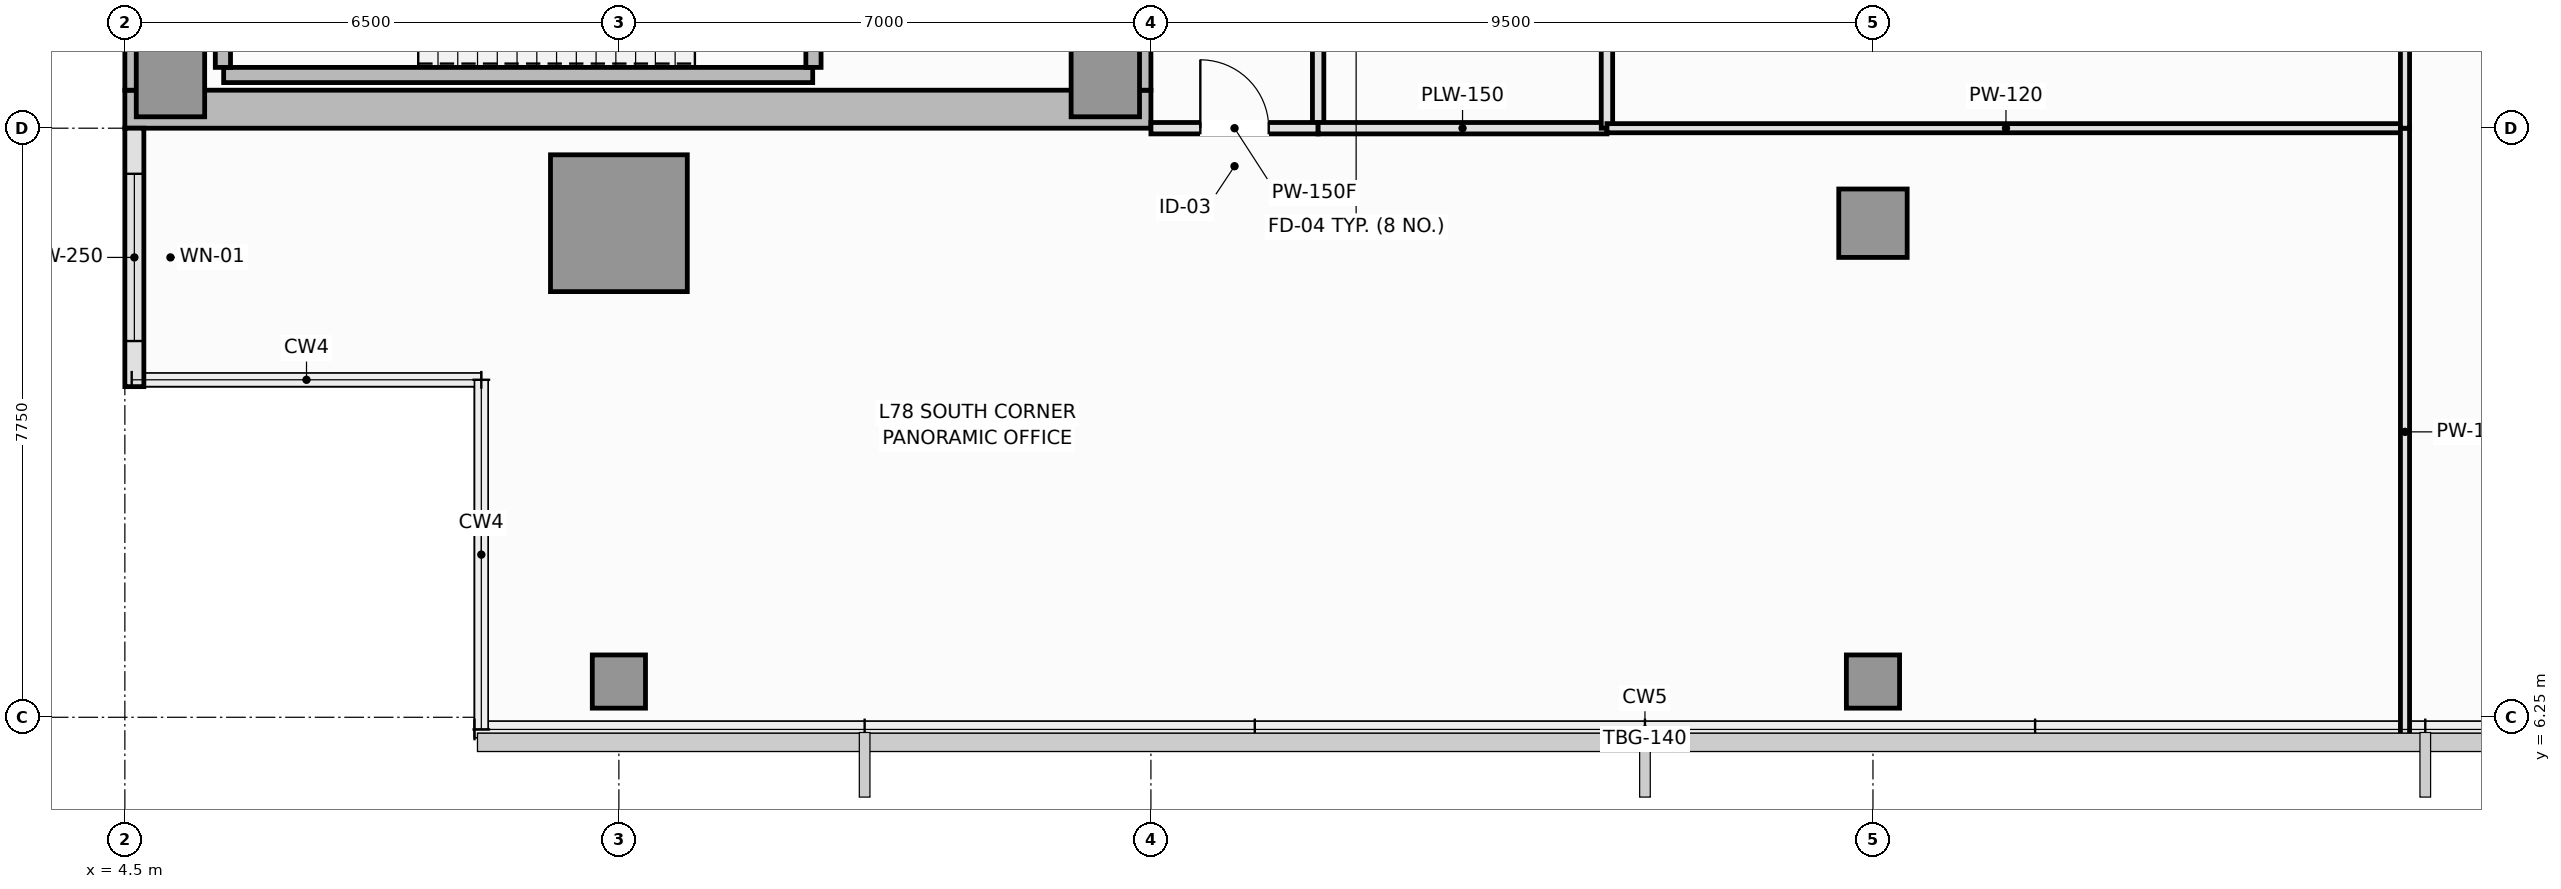
"""IFC4 building model, lengths in metres.
Left out: names, types, materials, properties, quantities, classifications, styles, units other than length and angle.
Written with IfcOpenShell. Run it as: python <this file> out.ifc"""

import sys

from ifc_helpers import new_model, si_unit, direction, frame, frame_2d, origin, origin_2d, place, context, subcontext, project, spatial, rectangle, extrude, element, fill, save


model = new_model("IFC4")
c1 = context("Model", 3, precision=1e-05, world=origin(), true_north=direction((0.0, 1.0)))
c2 = subcontext(c1, "Body", "Model", "MODEL_VIEW")
j1 = project(units=[si_unit("LENGTHUNIT", "METRE"), si_unit("PLANEANGLEUNIT", "RADIAN")], contexts=[c1])
p1 = place(None, origin())
s1 = spatial("IfcSite", under=j1, at=p1, CompositionType="ELEMENT")
p2 = place(p1, origin())
s2 = spatial("IfcBuilding", under=s1, at=p2, CompositionType="ELEMENT")
p3 = place(p2, frame((0.0, 0.0, 291.85)))
s3 = spatial("IfcBuildingStorey", under=s2, at=p3, CompositionType="ELEMENT", Elevation=291.85)
p4 = place(p3, frame((4.5, 14.25, 0.0), z_axis=(0.0, 0.0, 1.0), x_axis=(1.0, 0.0, 0.0)))
e1 = element("IfcWall", 1, at=p4, inside=s3, PredefinedType="SHEAR", context=c2, shape_type="SweptSolid", body=[
    extrude(rectangle(XDim=13.5, YDim=0.5, at=frame_2d((6.75, 0.0))), origin(), (0.0, 0.0, 1.0), 4.8),
])
p5 = place(p3, frame((4.75, 14.5, 0.0), z_axis=(0.0, 0.0, 1.0), x_axis=(0.0, 1.0, 0.0)))
e2 = element("IfcWall", 2, at=p5, inside=s3, PredefinedType="SHEAR", context=c2, shape_type="SweptSolid", body=[
    extrude(rectangle(XDim=21.5, YDim=0.5, at=frame_2d((10.75, 0.0))), origin(), (0.0, 0.0, 1.0), 4.8),
])
p6 = place(p3, frame((17.75, 14.5, 0.0), z_axis=(0.0, 0.0, 1.0), x_axis=(0.0, 1.0, 0.0)))
e3 = element("IfcWall", 3, at=p6, inside=s3, PredefinedType="SHEAR", context=c2, shape_type="SweptSolid", body=[
    extrude(rectangle(XDim=8.95, YDim=0.5, at=frame_2d((4.475, 0.0))), origin(), (0.0, 0.0, 1.0), 4.8),
])
p7 = place(p6, frame((4.4, 0.0, 0.0)))
e4 = element("IfcOpeningElement", 4, at=p7, cuts=e3, PredefinedType="OPENING", context=c2, shape_type="SweptSolid", body=[
    extrude(rectangle(XDim=1.1, YDim=2.15, at=frame_2d((0.55, 1.075))), frame((0.0, 0.26, 0.0), z_axis=(0.0, -1.0, 0.0), x_axis=(1.0, 0.0, 0.0)), (0.0, 0.0, 1.0), 0.52),
])
for number, where, z_axis, x_axis in (
    (5, (5.1, 14.6, 0.0), (0.0, 0.0, 1.0), (1.0, 0.0, 0.0)),
    (6, (17.4, 14.6, 0.0), (0.0, 0.0, 1.0), (1.0, 0.0, 0.0)),
):
    element("IfcColumn", number, at=place(p3, frame(where, z_axis=z_axis, x_axis=x_axis)), inside=s3, PredefinedType="PILASTER", context=c2, shape_type="SweptSolid", body=[
        extrude(rectangle(XDim=0.9, YDim=0.9, at=origin_2d()), origin(), (0.0, 0.0, 1.0), 4.8),
    ])
p8 = place(p3, frame((11.0, 12.75, 0.0), z_axis=(0.0, 0.0, 1.0), x_axis=(1.0, 0.0, 0.0)))
e7 = element("IfcColumn", 7, at=p8, inside=s3, PredefinedType="COLUMN", context=c2, shape_type="SweptSolid", body=[
    extrude(rectangle(XDim=1.8, YDim=1.8, at=origin_2d()), origin(), (0.0, 0.0, 1.0), 4.8),
])
p9 = place(p3, frame((27.5, 12.75, 0.0), z_axis=(0.0, 0.0, 1.0), x_axis=(1.0, 0.0, 0.0)))
e8 = element("IfcColumn", 8, at=p9, inside=s3, PredefinedType="COLUMN", context=c2, shape_type="SweptSolid", body=[
    extrude(rectangle(XDim=0.9, YDim=0.9, at=origin_2d()), origin(), (0.0, 0.0, 1.0), 4.8),
])
for number, where, z_axis, x_axis in (
    (9, (11.0, 6.72, 0.0), (0.0, 0.0, 1.0), (1.0, 0.0, 0.0)),
    (10, (27.5, 6.72, 0.0), (0.0, 0.0, 1.0), (1.0, 0.0, 0.0)),
):
    element("IfcColumn", number, at=place(p3, frame(where, z_axis=z_axis, x_axis=x_axis)), inside=s3, PredefinedType="COLUMN", context=c2, shape_type="SweptSolid", body=[
        extrude(rectangle(XDim=0.7, YDim=0.7, at=origin_2d()), origin(), (0.0, 0.0, 1.0), 4.8),
    ])
p10 = place(p3, frame((4.625, 14.0, 0.0), z_axis=(0.0, 0.0, 1.0), x_axis=(0.0, -1.0, 0.0)))
e11 = element("IfcWall", 11, at=p10, inside=s3, PredefinedType="SOLIDWALL", context=c2, shape_type="SweptSolid", body=[
    extrude(rectangle(XDim=3.4, YDim=0.25, at=frame_2d((1.7, 0.0))), origin(), (0.0, 0.0, 1.0), 4.6),
])
p11 = place(p10, frame((0.6, 0.0, 0.9)))
e12 = element("IfcOpeningElement", 12, at=p11, cuts=e11, PredefinedType="OPENING", context=c2, shape_type="SweptSolid", body=[
    extrude(rectangle(XDim=2.2, YDim=1.8, at=frame_2d((1.1, 0.9))), frame((0.0, 0.135, 0.0), z_axis=(0.0, -1.0, 0.0), x_axis=(1.0, 0.0, 0.0)), (0.0, 0.0, 1.0), 0.27),
])
p12 = place(p3, frame((5.8, 14.7, 0.0), z_axis=(0.0, 0.0, 1.0), x_axis=(1.0, 0.0, 0.0)))
e13 = element("IfcWall", 13, at=p12, inside=s3, PredefinedType="SOLIDWALL", context=c2, shape_type="SweptSolid", body=[
    extrude(rectangle(XDim=7.75, YDim=0.2, at=frame_2d((3.875, 0.0))), origin(), (0.0, 0.0, 1.0), 4.8),
])
p13 = place(p3, frame((5.79, 14.8, 0.0), z_axis=(0.0, 0.0, 1.0), x_axis=(0.0, 1.0, 0.0)))
e14 = element("IfcWall", 14, at=p13, inside=s3, PredefinedType="SOLIDWALL", context=c2, shape_type="SweptSolid", body=[
    extrude(rectangle(XDim=3.05, YDim=0.2, at=frame_2d((1.525, 0.0))), origin(), (0.0, 0.0, 1.0), 4.8),
])
p14 = place(p3, frame((13.56, 14.8, 0.0), z_axis=(0.0, 0.0, 1.0), x_axis=(0.0, 1.0, 0.0)))
e15 = element("IfcWall", 15, at=p14, inside=s3, PredefinedType="SOLIDWALL", context=c2, shape_type="SweptSolid", body=[
    extrude(rectangle(XDim=3.05, YDim=0.2, at=frame_2d((1.525, 0.0))), origin(), (0.0, 0.0, 1.0), 4.8),
])
p15 = place(p14, frame((0.95, 0.0, 0.0)))
e16 = element("IfcOpeningElement", 16, at=p15, cuts=e15, PredefinedType="OPENING", context=c2, shape_type="SweptSolid", body=[
    extrude(rectangle(XDim=1.15, YDim=2.15, at=frame_2d((0.575, 1.075))), frame((0.0, 0.11, 0.0), z_axis=(0.0, -1.0, 0.0), x_axis=(1.0, 0.0, 0.0)), (0.0, 0.0, 1.0), 0.22),
])
p16 = place(p3, frame((20.2, 14.0, 0.0), z_axis=(0.0, 0.0, 1.0), x_axis=(0.0, 1.0, 0.0)))
e17 = element("IfcWall", 17, at=p16, inside=s3, PredefinedType="PLUMBINGWALL", context=c2, shape_type="SweptSolid", body=[
    extrude(rectangle(XDim=3.4, YDim=0.15, at=frame_2d((1.7, 0.0))), origin(), (0.0, 0.0, 1.0), 4.6),
])
p17 = place(p16, frame((1.25, 0.0, 0.0)))
e18 = element("IfcOpeningElement", 18, at=p17, cuts=e17, PredefinedType="OPENING", context=c2, shape_type="SweptSolid", body=[
    extrude(rectangle(XDim=0.9, YDim=2.1, at=frame_2d((0.45, 1.05))), frame((0.0, 0.085, 0.0), z_axis=(0.0, -1.0, 0.0), x_axis=(1.0, 0.0, 0.0)), (0.0, 0.0, 1.0), 0.17),
])
p18 = place(p3, frame((18.0, 14.0, 0.0), z_axis=(0.0, 0.0, 1.0), x_axis=(1.0, 0.0, 0.0)))
e19 = element("IfcWall", 19, at=p18, inside=s3, PredefinedType="PARTITIONING", context=c2, shape_type="SweptSolid", body=[
    extrude(rectangle(XDim=2.2, YDim=0.15, at=frame_2d((1.1, 0.0))), origin(), (0.0, 0.0, 1.0), 4.6),
])
p19 = place(p18, frame((0.65, 0.0, 0.0)))
e20 = element("IfcOpeningElement", 20, at=p19, cuts=e19, PredefinedType="OPENING", context=c2, shape_type="SweptSolid", body=[
    extrude(rectangle(XDim=0.9, YDim=2.1, at=frame_2d((0.45, 1.05))), frame((0.0, 0.085, 0.0), z_axis=(0.0, -1.0, 0.0), x_axis=(1.0, 0.0, 0.0)), (0.0, 0.0, 1.0), 0.17),
])
p20 = place(p3, frame((20.2, 14.0, 0.0), z_axis=(0.0, 0.0, 1.0), x_axis=(1.0, 0.0, 0.0)))
e21 = element("IfcWall", 21, at=p20, inside=s3, PredefinedType="PLUMBINGWALL", context=c2, shape_type="SweptSolid", body=[
    extrude(rectangle(XDim=3.8, YDim=0.15, at=frame_2d((1.9, 0.0))), origin(), (0.0, 0.0, 1.0), 4.6),
])
p21 = place(p3, frame((24.0, 14.0, 0.0), z_axis=(0.0, 0.0, 1.0), x_axis=(0.0, 1.0, 0.0)))
e22 = element("IfcWall", 22, at=p21, inside=s3, PredefinedType="PLUMBINGWALL", context=c2, shape_type="SweptSolid", body=[
    extrude(rectangle(XDim=3.4, YDim=0.15, at=frame_2d((1.7, 0.0))), origin(), (0.0, 0.0, 1.0), 4.15),
])
p22 = place(p3, frame((24.0, 14.0, 0.0), z_axis=(0.0, 0.0, 1.0), x_axis=(1.0, 0.0, 0.0)))
e23 = element("IfcWall", 23, at=p22, inside=s3, PredefinedType="PARTITIONING", context=c2, shape_type="SweptSolid", body=[
    extrude(rectangle(XDim=10.5, YDim=0.12, at=frame_2d((5.25, 0.0))), origin(), (0.0, 0.0, 1.0), 4.6),
])
p23 = place(p3, frame((34.5, 6.01, 0.0), z_axis=(0.0, 0.0, 1.0), x_axis=(0.0, 1.0, 0.0)))
e24 = element("IfcWall", 24, at=p23, inside=s3, PredefinedType="PARTITIONING", context=c2, shape_type="SweptSolid", body=[
    extrude(rectangle(XDim=7.99, YDim=0.12, at=frame_2d((3.995, 0.0))), origin(), (0.0, 0.0, 1.0), 4.15),
])
p24 = place(p3, frame((34.5, 14.0, 0.0), z_axis=(0.0, 0.0, 1.0), x_axis=(0.0, 1.0, 0.0)))
e25 = element("IfcWall", 25, at=p24, inside=s3, PredefinedType="PARTITIONING", context=c2, shape_type="SweptSolid", body=[
    extrude(rectangle(XDim=9.8, YDim=0.12, at=frame_2d((4.9, 0.0))), origin(), (0.0, 0.0, 1.0), 4.6),
])
p25 = place(p11, origin())
e26 = element("IfcWindow", 26, at=p25, inside=s3, PartitioningType="SINGLE_PANEL", PredefinedType="WINDOW", context=c2, shape_type="SweptSolid", body=[
    extrude(rectangle(XDim=2.2, YDim=1.8, at=frame_2d((1.1, 0.9))), frame((0.0, 0.03, 0.0), z_axis=(0.0, -1.0, 0.0), x_axis=(1.0, 0.0, 0.0)), (0.0, 0.0, 1.0), 0.06),
])
fill(e12, e26)
p26 = place(p19, origin())
e27 = element("IfcDoor", 27, at=p26, inside=s3, OperationType="SINGLE_SWING_LEFT", PredefinedType="DOOR", context=c2, shape_type="SweptSolid", body=[
    extrude(rectangle(XDim=0.9, YDim=2.1, at=frame_2d((0.45, 1.05))), frame((0.0, 0.025, 0.0), z_axis=(0.0, -1.0, 0.0), x_axis=(1.0, 0.0, 0.0)), (0.0, 0.0, 1.0), 0.05),
])
fill(e20, e27)
save(model, sys.argv[1])
